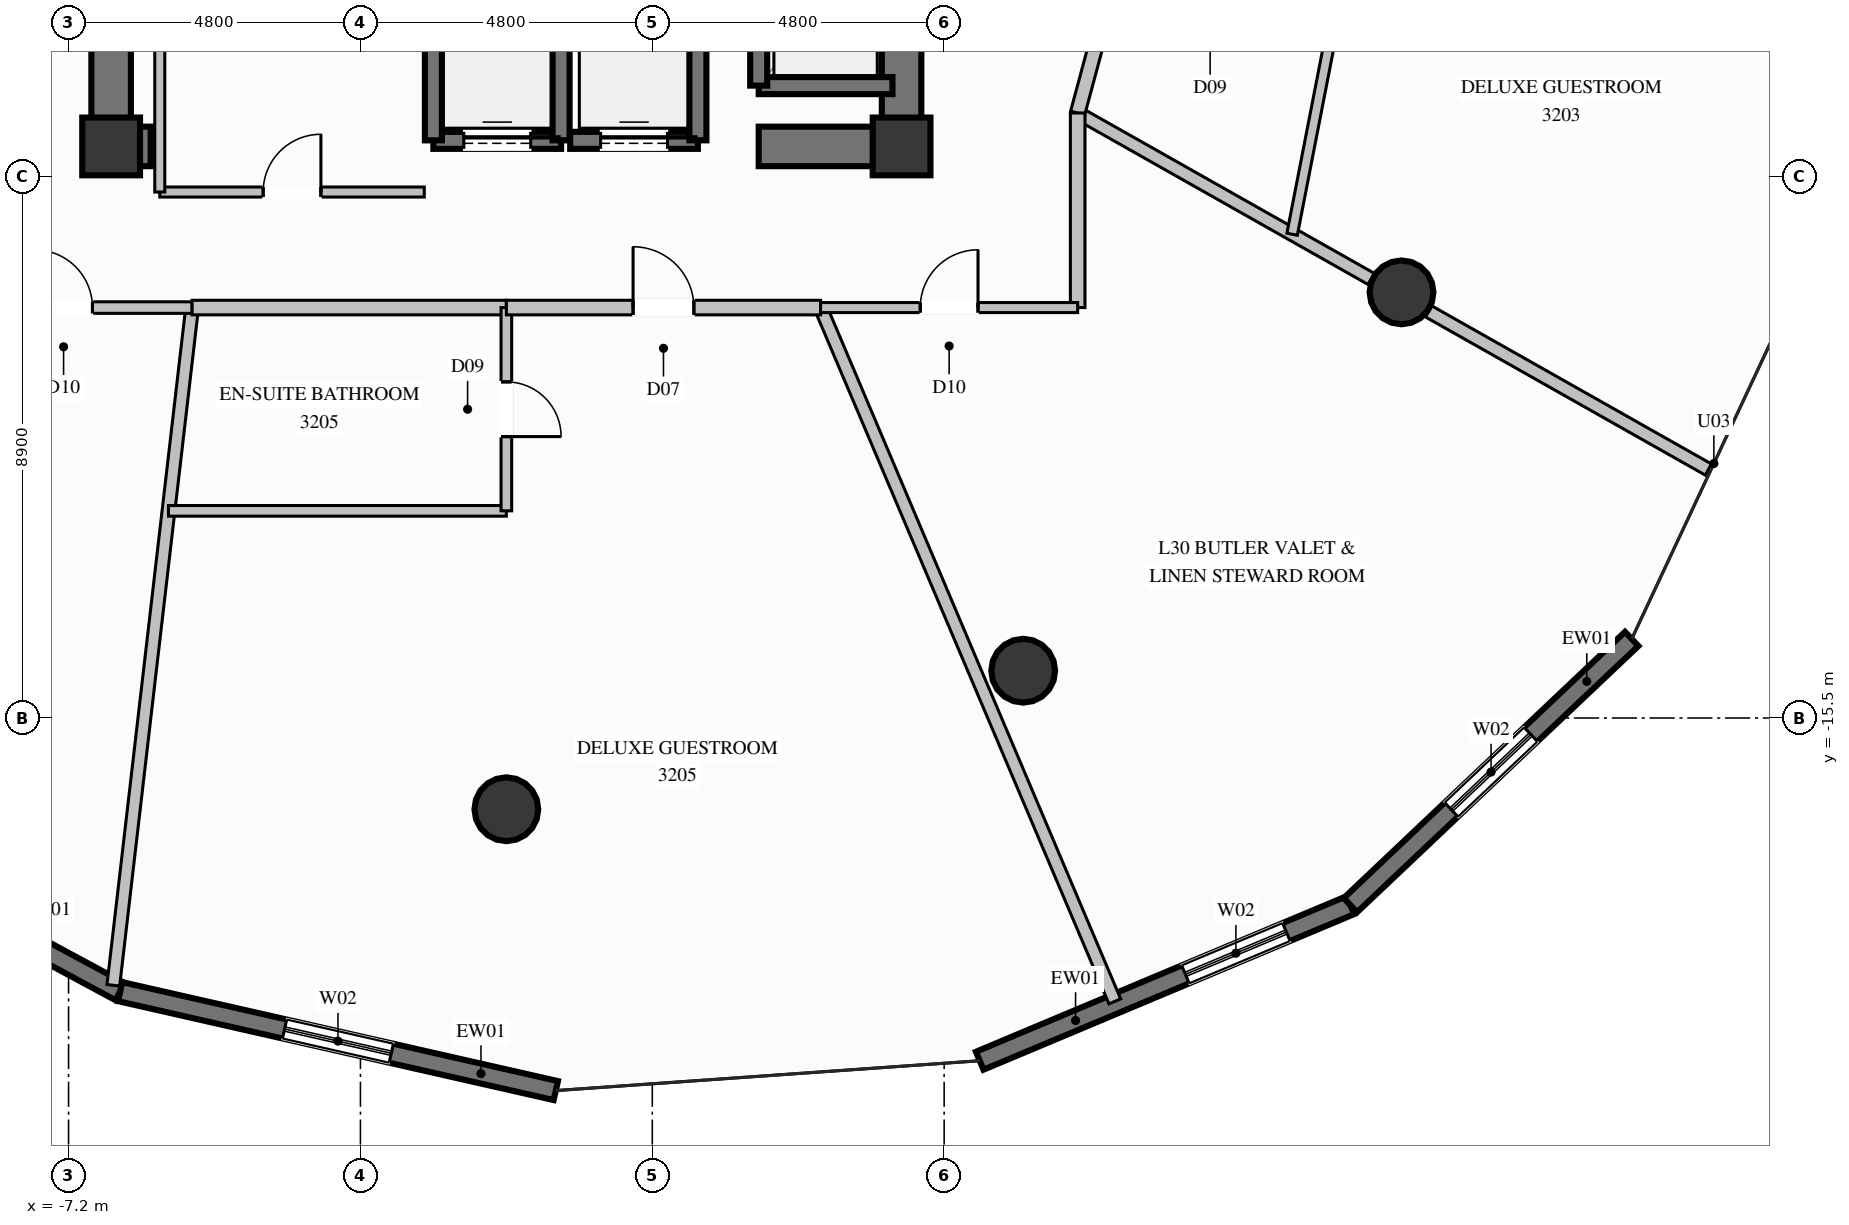
"""IFC4 building model, lengths in metres.
Left out: names, types, materials, properties, quantities, classifications, styles, units other than length and angle.
Written with IfcOpenShell. Run it as: python <this file> out.ifc"""

import sys

from ifc_helpers import new_model, si_unit, direction, frame, frame_2d, origin, origin_2d, place, context, subcontext, project, spatial, rectangle, circle, extrude, element, fill, save


model = new_model("IFC4")
c1 = context("Model", 3, precision=1e-05, world=origin(), true_north=direction((0.0, 1.0)))
c2 = subcontext(c1, "Body", "Model", "MODEL_VIEW")
j1 = project(units=[si_unit("LENGTHUNIT", "METRE"), si_unit("PLANEANGLEUNIT", "RADIAN")], contexts=[c1])
p1 = place(None, origin())
s1 = spatial("IfcSite", under=j1, at=p1, CompositionType="ELEMENT")
p2 = place(p1, origin())
s2 = spatial("IfcBuilding", under=s1, at=p2, CompositionType="ELEMENT")
p3 = place(p2, frame((0.0, 0.0, 120.6)))
s3 = spatial("IfcBuildingStorey", under=s2, at=p3, CompositionType="ELEMENT", Elevation=120.6)
for number, where, z_axis, x_axis in (
    (1, (-6.5, -6.1, 0.0), (0.0, 0.0, 1.0), (1.0, 0.0, 0.0)),
    (2, (6.5, -6.1, 0.0), (0.0, 0.0, 1.0), (1.0, 0.0, 0.0)),
):
    element("IfcColumn", number, at=place(p3, frame(where, z_axis=z_axis, x_axis=x_axis)), inside=s3, PredefinedType="COLUMN", context=c2, shape_type="SweptSolid", body=[
        extrude(rectangle(XDim=0.95, YDim=0.95, at=origin_2d()), origin(), (0.0, 0.0, 1.0), 3.6),
    ])
p4 = place(p3, frame((-6.175, -6.1, 0.0), z_axis=(0.0, 0.0, 1.0), x_axis=(1.0, 0.0, 0.0)))
e3 = element("IfcWall", 3, at=p4, inside=s3, PredefinedType="SHEAR", context=c2, shape_type="SweptSolid", body=[
    extrude(rectangle(XDim=0.325, YDim=0.65, at=frame_2d((0.163, 0.0))), origin(), (0.0, 0.0, 1.0), 3.6),
])
p5 = place(p3, frame((4.15, -6.1, 0.0), z_axis=(0.0, 0.0, 1.0), x_axis=(1.0, 0.0, 0.0)))
e4 = element("IfcWall", 4, at=p5, inside=s3, PredefinedType="SHEAR", context=c2, shape_type="SweptSolid", body=[
    extrude(rectangle(XDim=2.025, YDim=0.65, at=frame_2d((1.013, 0.0))), origin(), (0.0, 0.0, 1.0), 3.6),
])
p6 = place(p3, frame((-6.5, -6.425, 0.0), z_axis=(0.0, 0.0, 1.0), x_axis=(0.0, 1.0, 0.0)))
e5 = element("IfcWall", 5, at=p6, inside=s3, PredefinedType="SHEAR", context=c2, shape_type="SweptSolid", body=[
    extrude(rectangle(XDim=3.075, YDim=0.65, at=frame_2d((1.538, 0.0))), origin(), (0.0, 0.0, 1.0), 3.6),
])
p7 = place(p3, frame((6.5, -6.425, 0.0), z_axis=(0.0, 0.0, 1.0), x_axis=(0.0, 1.0, 0.0)))
e6 = element("IfcWall", 6, at=p7, inside=s3, PredefinedType="SHEAR", context=c2, shape_type="SweptSolid", body=[
    extrude(rectangle(XDim=4.075, YDim=0.65, at=frame_2d((2.038, 0.0))), origin(), (0.0, 0.0, 1.0), 3.6),
])
for number, where, z_axis, x_axis in (
    (7, (0.0, -17.0, 0.0), (0.0, 0.0, 1.0), (1.0, 0.0, 0.0)),
    (8, (8.5, -14.722, 0.0), (0.0, 0.0, 1.0), (1.0, 0.0, 0.0)),
    (9, (14.722, -8.5, 0.0), (0.0, 0.0, 1.0), (1.0, 0.0, 0.0)),
):
    element("IfcColumn", number, at=place(p3, frame(where, z_axis=z_axis, x_axis=x_axis)), inside=s3, PredefinedType="COLUMN", context=c2, shape_type="SweptSolid", body=[
        extrude(circle(Radius=0.525, at=origin_2d()), origin(), (0.0, 0.0, 1.0), 3.6),
    ])
p8 = place(p3, frame((-6.352, -20.0, 0.0), z_axis=(0.0, 0.0, 1.0), x_axis=(-0.880443095894, 0.474151826836, 0.0)))
e10 = element("IfcWall", 10, at=p8, inside=s3, PredefinedType="SOLIDWALL", context=c2, shape_type="SweptSolid", body=[
    extrude(rectangle(XDim=7.559, YDim=0.32, at=frame_2d((3.779, 0.0))), origin(), (0.0, 0.0, 1.0), 3.35),
])
p9 = place(p8, frame((3.004, 0.0, 0.35)))
e11 = element("IfcOpeningElement", 11, at=p9, cuts=e10, PredefinedType="OPENING", context=c2, shape_type="SweptSolid", body=[
    extrude(rectangle(XDim=1.8, YDim=2.6, at=frame_2d((0.9, 1.3))), frame((0.0, 0.17, 0.0), z_axis=(0.0, -1.0, 0.0), x_axis=(1.0, 0.0, 0.0)), (0.0, 0.0, 1.0), 0.34),
])
p10 = place(p3, frame((0.813, -21.627, 0.0), z_axis=(0.0, 0.0, 1.0), x_axis=(-0.975175922812, 0.22143152343, 0.0)))
e12 = element("IfcWall", 12, at=p10, inside=s3, PredefinedType="SOLIDWALL", context=c2, shape_type="SweptSolid", body=[
    extrude(rectangle(XDim=7.347, YDim=0.32, at=frame_2d((3.674, 0.0))), origin(), (0.0, 0.0, 1.0), 3.35),
])
p11 = place(p10, frame((2.774, 0.0, 0.35)))
e13 = element("IfcOpeningElement", 13, at=p11, cuts=e12, PredefinedType="OPENING", context=c2, shape_type="SweptSolid", body=[
    extrude(rectangle(XDim=1.8, YDim=2.6, at=frame_2d((0.9, 1.3))), frame((0.0, 0.17, 0.0), z_axis=(0.0, -1.0, 0.0), x_axis=(1.0, 0.0, 0.0)), (0.0, 0.0, 1.0), 0.34),
])
p12 = place(p3, frame((13.882, -18.577, 0.0), z_axis=(0.0, 0.0, 1.0), x_axis=(-0.92207540552, -0.387010266704, 0.0)))
e14 = element("IfcWall", 14, at=p12, inside=s3, PredefinedType="SOLIDWALL", context=c2, shape_type="SweptSolid", body=[
    extrude(rectangle(XDim=6.613, YDim=0.32, at=frame_2d((3.306, 0.0))), origin(), (0.0, 0.0, 1.0), 3.35),
])
p13 = place(p12, frame((1.143, 0.0, 0.35)))
e15 = element("IfcOpeningElement", 15, at=p13, cuts=e14, PredefinedType="OPENING", context=c2, shape_type="SweptSolid", body=[
    extrude(rectangle(XDim=1.8, YDim=2.6, at=frame_2d((0.9, 1.3))), frame((0.0, 0.17, 0.0), z_axis=(0.0, -1.0, 0.0), x_axis=(1.0, 0.0, 0.0)), (0.0, 0.0, 1.0), 0.34),
])
p14 = place(p3, frame((18.508, -14.199, 0.0), z_axis=(0.0, 0.0, 1.0), x_axis=(-0.726311169537, -0.687366048773, 0.0)))
e16 = element("IfcWall", 16, at=p14, inside=s3, PredefinedType="SOLIDWALL", context=c2, shape_type="SweptSolid", body=[
    extrude(rectangle(XDim=6.369, YDim=0.32, at=frame_2d((3.185, 0.0))), origin(), (0.0, 0.0, 1.0), 3.35),
])
p15 = place(p14, frame((2.285, 0.0, 0.35)))
e17 = element("IfcOpeningElement", 17, at=p15, cuts=e16, PredefinedType="OPENING", context=c2, shape_type="SweptSolid", body=[
    extrude(rectangle(XDim=1.8, YDim=2.6, at=frame_2d((0.9, 1.3))), frame((0.0, 0.17, 0.0), z_axis=(0.0, -1.0, 0.0), x_axis=(1.0, 0.0, 0.0)), (0.0, 0.0, 1.0), 0.34),
])
p16 = place(p3, frame((-1.2, -6.0, 0.0), z_axis=(0.0, 0.0, 1.0), x_axis=(1.0, 0.0, 0.0)))
e18 = element("IfcWall", 18, at=p16, inside=s3, PredefinedType="SOLIDWALL", context=c2, shape_type="SweptSolid", body=[
    extrude(rectangle(XDim=2.1, YDim=0.28, at=frame_2d((1.05, 0.0))), origin(), (0.0, 0.0, 1.0), 3.35),
])
p17 = place(p16, frame((0.5, 0.0, 0.0)))
e19 = element("IfcOpeningElement", 19, at=p17, cuts=e18, PredefinedType="OPENING", context=c2, shape_type="SweptSolid", body=[
    extrude(rectangle(XDim=1.1, YDim=2.2, at=frame_2d((0.55, 1.1))), frame((0.0, 0.15, 0.0), z_axis=(0.0, -1.0, 0.0), x_axis=(1.0, 0.0, 0.0)), (0.0, 0.0, 1.0), 0.3),
])
for number, where, z_axis, x_axis in (
    (20, (-1.2, -3.5, 0.0), (0.0, 0.0, 1.0), (0.0, -1.0, 0.0)),
    (21, (0.9, -6.0, 0.0), (0.0, 0.0, 1.0), (0.0, 1.0, 0.0)),
):
    element("IfcWall", number, at=place(p3, frame(where, z_axis=z_axis, x_axis=x_axis)), inside=s3, PredefinedType="SOLIDWALL", context=c2, shape_type="SweptSolid", body=[
        extrude(rectangle(XDim=2.5, YDim=0.28, at=frame_2d((1.25, 0.0))), origin(), (0.0, 0.0, 1.0), 3.35),
    ])
p18 = place(p3, frame((1.05, -6.0, 0.0), z_axis=(0.0, 0.0, 1.0), x_axis=(1.0, 0.0, 0.0)))
e22 = element("IfcWall", 22, at=p18, inside=s3, PredefinedType="SOLIDWALL", context=c2, shape_type="SweptSolid", body=[
    extrude(rectangle(XDim=2.1, YDim=0.28, at=frame_2d((1.05, 0.0))), origin(), (0.0, 0.0, 1.0), 3.35),
])
p19 = place(p18, frame((0.5, 0.0, 0.0)))
e23 = element("IfcOpeningElement", 23, at=p19, cuts=e22, PredefinedType="OPENING", context=c2, shape_type="SweptSolid", body=[
    extrude(rectangle(XDim=1.1, YDim=2.2, at=frame_2d((0.55, 1.1))), frame((0.0, 0.15, 0.0), z_axis=(0.0, -1.0, 0.0), x_axis=(1.0, 0.0, 0.0)), (0.0, 0.0, 1.0), 0.3),
])
p20 = place(p3, frame((3.15, -6.0, 0.0), z_axis=(0.0, 0.0, 1.0), x_axis=(0.0, 1.0, 0.0)))
e24 = element("IfcWall", 24, at=p20, inside=s3, PredefinedType="SOLIDWALL", context=c2, shape_type="SweptSolid", body=[
    extrude(rectangle(XDim=2.5, YDim=0.28, at=frame_2d((1.25, 0.0))), origin(), (0.0, 0.0, 1.0), 3.35),
])
p21 = place(p3, frame((4.15, -5.1, 0.0), z_axis=(0.0, 0.0, 1.0), x_axis=(1.0, 0.0, 0.0)))
e25 = element("IfcWall", 25, at=p21, inside=s3, PredefinedType="SOLIDWALL", context=c2, shape_type="SweptSolid", body=[
    extrude(rectangle(XDim=2.2, YDim=0.28, at=frame_2d((1.1, 0.0))), origin(), (0.0, 0.0, 1.0), 3.35),
])
p22 = place(p3, frame((4.15, -2.4, 0.0), z_axis=(0.0, 0.0, 1.0), x_axis=(0.0, -1.0, 0.0)))
e26 = element("IfcWall", 26, at=p22, inside=s3, PredefinedType="SOLIDWALL", context=c2, shape_type="SweptSolid", body=[
    extrude(rectangle(XDim=2.7, YDim=0.28, at=frame_2d((1.35, 0.0))), origin(), (0.0, 0.0, 1.0), 3.35),
])
p23 = place(p3, frame((-5.7, -6.85, 0.0), z_axis=(0.0, 0.0, 1.0), x_axis=(1.0, 0.0, 0.0)))
e27 = element("IfcWall", 27, at=p23, inside=s3, PredefinedType="PARTITIONING", context=c2, shape_type="SweptSolid", body=[
    extrude(rectangle(XDim=4.35, YDim=0.165, at=frame_2d((2.175, 0.0))), origin(), (0.0, 0.0, 1.0), 2.435),
])
p24 = place(p23, frame((1.7, 0.0, 0.0)))
e28 = element("IfcOpeningElement", 28, at=p24, cuts=e27, PredefinedType="OPENING", context=c2, shape_type="SweptSolid", body=[
    extrude(rectangle(XDim=0.95, YDim=2.1, at=frame_2d((0.475, 1.05))), frame((0.0, 0.093, 0.0), z_axis=(0.0, -1.0, 0.0), x_axis=(1.0, 0.0, 0.0)), (0.0, 0.0, 1.0), 0.185),
])
p25 = place(p3, frame((-5.7, -3.5, 0.0), z_axis=(0.0, 0.0, 1.0), x_axis=(0.0, -1.0, 0.0)))
e29 = element("IfcWall", 29, at=p25, inside=s3, PredefinedType="PARTITIONING", context=c2, shape_type="SweptSolid", body=[
    extrude(rectangle(XDim=3.35, YDim=0.165, at=frame_2d((1.675, 0.0))), origin(), (0.0, 0.0, 1.0), 2.435),
])
p26 = place(p3, frame((9.396, -5.55, 0.0), z_axis=(0.0, 0.0, 1.0), x_axis=(0.870557919432, -0.492065959922, 0.0)))
e30 = element("IfcWall", 30, at=p26, inside=s3, PredefinedType="PARTITIONING", context=c2, shape_type="SweptSolid", body=[
    extrude(rectangle(XDim=5.546, YDim=0.21, at=frame_2d((2.773, 0.0))), origin(), (0.0, 0.0, 1.0), 2.719),
])
p27 = place(p3, frame((15.168, -8.813, 0.0), z_axis=(0.0, 0.0, 1.0), x_axis=(0.870524982939, -0.492124226267, 0.0)))
e31 = element("IfcWall", 31, at=p27, inside=s3, PredefinedType="PARTITIONING", context=c2, shape_type="SweptSolid", body=[
    extrude(rectangle(XDim=5.285, YDim=0.21, at=frame_2d((2.643, 0.0))), origin(), (0.0, 0.0, 1.0), 3.35),
])
p28 = place(p3, frame((9.396, -5.55, 0.0), z_axis=(0.0, 0.0, 1.0), x_axis=(0.260152382661, 0.965567572879, 0.0)))
e32 = element("IfcWall", 32, at=p28, inside=s3, PredefinedType="PARTITIONING", context=c2, shape_type="SweptSolid", body=[
    extrude(rectangle(XDim=2.349, YDim=0.24, at=frame_2d((1.174, 0.0))), origin(), (0.0, 0.0, 1.0), 3.35),
])
p29 = place(p3, frame((12.923, -7.544, 0.0), z_axis=(0.0, 0.0, 1.0), x_axis=(0.191132211705, 0.981564301332, 0.0)))
e33 = element("IfcWall", 33, at=p29, inside=s3, PredefinedType="PLUMBINGWALL", context=c2, shape_type="SweptSolid", body=[
    extrude(rectangle(XDim=3.186, YDim=0.175, at=frame_2d((1.593, 0.0))), origin(), (0.0, 0.0, 1.0), 3.35),
])
p30 = place(p3, frame((-5.168, -8.75, 0.0), z_axis=(0.0, 0.0, 1.0), x_axis=(-0.115519331372, -0.993305232081, 0.0)))
e34 = element("IfcWall", 34, at=p30, inside=s3, PredefinedType="PARTITIONING", context=c2, shape_type="SweptSolid", body=[
    extrude(rectangle(XDim=11.22, YDim=0.21, at=frame_2d((5.61, 0.0))), origin(), (0.0, 0.0, 1.0), 3.35),
])
p31 = place(p3, frame((-9.396, -8.75, 0.0), z_axis=(0.0, 0.0, 1.0), x_axis=(1.0, 0.0, 0.0)))
e35 = element("IfcWall", 35, at=p31, inside=s3, PredefinedType="PARTITIONING", context=c2, shape_type="SweptSolid", body=[
    extrude(rectangle(XDim=4.228, YDim=0.19, at=frame_2d((2.114, 0.0))), origin(), (0.0, 0.0, 1.0), 3.35),
])
p32 = place(p31, frame((1.639, 0.0, 0.0)))
e36 = element("IfcOpeningElement", 36, at=p32, cuts=e35, PredefinedType="OPENING", context=c2, shape_type="SweptSolid", body=[
    extrude(rectangle(XDim=0.95, YDim=2.1, at=frame_2d((0.475, 1.05))), frame((0.0, 0.105, 0.0), z_axis=(0.0, -1.0, 0.0), x_axis=(1.0, 0.0, 0.0)), (0.0, 0.0, 1.0), 0.21),
])
p33 = place(p3, frame((-5.168, -8.75, 0.0), z_axis=(0.0, 0.0, 1.0), x_axis=(1.0, 0.0, 0.0)))
e37 = element("IfcWall", 37, at=p33, inside=s3, PredefinedType="PARTITIONING", context=c2, shape_type="SweptSolid", body=[
    extrude(rectangle(XDim=5.168, YDim=0.24, at=frame_2d((2.584, 0.0))), origin(), (0.0, 0.0, 1.0), 3.35),
])
p34 = place(p3, frame((-5.557, -12.093, 0.0), z_axis=(0.0, 0.0, 1.0), x_axis=(1.0, 0.0, 0.0)))
e38 = element("IfcWall", 38, at=p34, inside=s3, PredefinedType="PLUMBINGWALL", context=c2, shape_type="SweptSolid", body=[
    extrude(rectangle(XDim=5.557, YDim=0.175, at=frame_2d((2.778, 0.0))), origin(), (0.0, 0.0, 1.0), 3.35),
])
p35 = place(p3, frame((0.0, -8.75, 0.0), z_axis=(0.0, 0.0, 1.0), x_axis=(0.0, -1.0, 0.0)))
e39 = element("IfcWall", 39, at=p35, inside=s3, PredefinedType="PLUMBINGWALL", context=c2, shape_type="SweptSolid", body=[
    extrude(rectangle(XDim=3.343, YDim=0.175, at=frame_2d((1.671, 0.0))), origin(), (0.0, 0.0, 1.0), 3.35),
])
p36 = place(p35, frame((1.222, 0.0, 0.0)))
e40 = element("IfcOpeningElement", 40, at=p36, cuts=e39, PredefinedType="OPENING", context=c2, shape_type="SweptSolid", body=[
    extrude(rectangle(XDim=0.9, YDim=2.1, at=frame_2d((0.45, 1.05))), frame((0.0, 0.098, 0.0), z_axis=(0.0, -1.0, 0.0), x_axis=(1.0, 0.0, 0.0)), (0.0, 0.0, 1.0), 0.195),
])
p37 = place(p3, frame((5.168, -8.75, 0.0), z_axis=(0.0, 0.0, 1.0), x_axis=(0.390450185433, -0.920624056114, 0.0)))
e41 = element("IfcWall", 41, at=p37, inside=s3, PredefinedType="PARTITIONING", context=c2, shape_type="SweptSolid", body=[
    extrude(rectangle(XDim=12.394, YDim=0.21, at=frame_2d((6.197, 0.0))), origin(), (0.0, 0.0, 1.0), 3.35),
])
p38 = place(p3, frame((0.0, -8.75, 0.0), z_axis=(0.0, 0.0, 1.0), x_axis=(1.0, 0.0, 0.0)))
e42 = element("IfcWall", 42, at=p38, inside=s3, PredefinedType="PARTITIONING", context=c2, shape_type="SweptSolid", body=[
    extrude(rectangle(XDim=5.168, YDim=0.24, at=frame_2d((2.584, 0.0))), origin(), (0.0, 0.0, 1.0), 3.35),
])
p39 = place(p38, frame((2.084, 0.0, 0.0)))
e43 = element("IfcOpeningElement", 43, at=p39, cuts=e42, PredefinedType="OPENING", context=c2, shape_type="SweptSolid", body=[
    extrude(rectangle(XDim=1.0, YDim=2.2, at=frame_2d((0.5, 1.1))), frame((0.0, 0.13, 0.0), z_axis=(0.0, -1.0, 0.0), x_axis=(1.0, 0.0, 0.0)), (0.0, 0.0, 1.0), 0.26),
])
p40 = place(p3, frame((9.396, -8.75, 0.0), z_axis=(0.0, 0.0, 1.0), x_axis=(0.0, 1.0, 0.0)))
e44 = element("IfcWall", 44, at=p40, inside=s3, PredefinedType="PARTITIONING", context=c2, shape_type="SweptSolid", body=[
    extrude(rectangle(XDim=3.2, YDim=0.24, at=frame_2d((1.6, 0.0))), origin(), (0.0, 0.0, 1.0), 3.35),
])
p41 = place(p3, frame((5.168, -8.75, 0.0), z_axis=(0.0, 0.0, 1.0), x_axis=(1.0, 0.0, 0.0)))
e45 = element("IfcWall", 45, at=p41, inside=s3, PredefinedType="PARTITIONING", context=c2, shape_type="SweptSolid", body=[
    extrude(rectangle(XDim=4.228, YDim=0.165, at=frame_2d((2.114, 0.0))), origin(), (0.0, 0.0, 1.0), 3.35),
])
p42 = place(p41, frame((1.639, 0.0, 0.0)))
e46 = element("IfcOpeningElement", 46, at=p42, cuts=e45, PredefinedType="OPENING", context=c2, shape_type="SweptSolid", body=[
    extrude(rectangle(XDim=0.95, YDim=2.1, at=frame_2d((0.475, 1.05))), frame((0.0, 0.093, 0.0), z_axis=(0.0, -1.0, 0.0), x_axis=(1.0, 0.0, 0.0)), (0.0, 0.0, 1.0), 0.185),
])
p43 = place(p11, origin())
e47 = element("IfcWindow", 47, at=p43, inside=s3, PartitioningType="SINGLE_PANEL", PredefinedType="WINDOW", context=c2, shape_type="SweptSolid", body=[
    extrude(rectangle(XDim=1.8, YDim=2.6, at=frame_2d((0.9, 1.3))), frame((0.0, 0.03, 0.0), z_axis=(0.0, -1.0, 0.0), x_axis=(1.0, 0.0, 0.0)), (0.0, 0.0, 1.0), 0.06),
])
fill(e13, e47)
p44 = place(p13, origin())
e48 = element("IfcWindow", 48, at=p44, inside=s3, PartitioningType="SINGLE_PANEL", PredefinedType="WINDOW", context=c2, shape_type="SweptSolid", body=[
    extrude(rectangle(XDim=1.8, YDim=2.6, at=frame_2d((0.9, 1.3))), frame((0.0, 0.03, 0.0), z_axis=(0.0, -1.0, 0.0), x_axis=(1.0, 0.0, 0.0)), (0.0, 0.0, 1.0), 0.06),
])
fill(e15, e48)
p45 = place(p15, origin())
e49 = element("IfcWindow", 49, at=p45, inside=s3, PartitioningType="SINGLE_PANEL", PredefinedType="WINDOW", context=c2, shape_type="SweptSolid", body=[
    extrude(rectangle(XDim=1.8, YDim=2.6, at=frame_2d((0.9, 1.3))), frame((0.0, 0.03, 0.0), z_axis=(0.0, -1.0, 0.0), x_axis=(1.0, 0.0, 0.0)), (0.0, 0.0, 1.0), 0.06),
])
fill(e17, e49)
p46 = place(p17, origin())
e50 = element("IfcDoor", 50, at=p46, inside=s3, OperationType="SLIDING_TO_LEFT", PredefinedType="DOOR", context=c2, shape_type="SweptSolid", body=[
    extrude(rectangle(XDim=1.1, YDim=2.2, at=frame_2d((0.55, 1.1))), frame((0.0, 0.025, 0.0), z_axis=(0.0, -1.0, 0.0), x_axis=(1.0, 0.0, 0.0)), (0.0, 0.0, 1.0), 0.05),
])
fill(e19, e50)
p47 = place(p19, origin())
e51 = element("IfcDoor", 51, at=p47, inside=s3, OperationType="SLIDING_TO_LEFT", PredefinedType="DOOR", context=c2, shape_type="SweptSolid", body=[
    extrude(rectangle(XDim=1.1, YDim=2.2, at=frame_2d((0.55, 1.1))), frame((0.0, 0.025, 0.0), z_axis=(0.0, -1.0, 0.0), x_axis=(1.0, 0.0, 0.0)), (0.0, 0.0, 1.0), 0.05),
])
fill(e23, e51)
p48 = place(p24, origin())
e52 = element("IfcDoor", 52, at=p48, inside=s3, OperationType="SINGLE_SWING_RIGHT", PredefinedType="DOOR", context=c2, shape_type="SweptSolid", body=[
    extrude(rectangle(XDim=0.95, YDim=2.1, at=frame_2d((0.475, 1.05))), frame((0.0, 0.025, 0.0), z_axis=(0.0, -1.0, 0.0), x_axis=(1.0, 0.0, 0.0)), (0.0, 0.0, 1.0), 0.05),
])
fill(e28, e52)
p49 = place(p32, origin())
e53 = element("IfcDoor", 53, at=p49, inside=s3, OperationType="SINGLE_SWING_LEFT", PredefinedType="DOOR", context=c2, shape_type="SweptSolid", body=[
    extrude(rectangle(XDim=0.95, YDim=2.1, at=frame_2d((0.475, 1.05))), frame((0.0, 0.025, 0.0), z_axis=(0.0, -1.0, 0.0), x_axis=(1.0, 0.0, 0.0)), (0.0, 0.0, 1.0), 0.05),
])
fill(e36, e53)
p50 = place(p36, origin())
e54 = element("IfcDoor", 54, at=p50, inside=s3, OperationType="SINGLE_SWING_RIGHT", PredefinedType="DOOR", context=c2, shape_type="SweptSolid", body=[
    extrude(rectangle(XDim=0.9, YDim=2.1, at=frame_2d((0.45, 1.05))), frame((0.0, 0.025, 0.0), z_axis=(0.0, -1.0, 0.0), x_axis=(1.0, 0.0, 0.0)), (0.0, 0.0, 1.0), 0.05),
])
fill(e40, e54)
p51 = place(p39, origin())
e55 = element("IfcDoor", 55, at=p51, inside=s3, OperationType="SINGLE_SWING_LEFT", PredefinedType="DOOR", context=c2, shape_type="SweptSolid", body=[
    extrude(rectangle(XDim=1.0, YDim=2.2, at=frame_2d((0.5, 1.1))), frame((0.0, 0.025, 0.0), z_axis=(0.0, -1.0, 0.0), x_axis=(1.0, 0.0, 0.0)), (0.0, 0.0, 1.0), 0.05),
])
fill(e43, e55)
p52 = place(p42, origin())
e56 = element("IfcDoor", 56, at=p52, inside=s3, OperationType="SINGLE_SWING_RIGHT", PredefinedType="DOOR", context=c2, shape_type="SweptSolid", body=[
    extrude(rectangle(XDim=0.95, YDim=2.1, at=frame_2d((0.475, 1.05))), frame((0.0, 0.025, 0.0), z_axis=(0.0, -1.0, 0.0), x_axis=(1.0, 0.0, 0.0)), (0.0, 0.0, 1.0), 0.05),
])
fill(e46, e56)
save(model, sys.argv[1])
